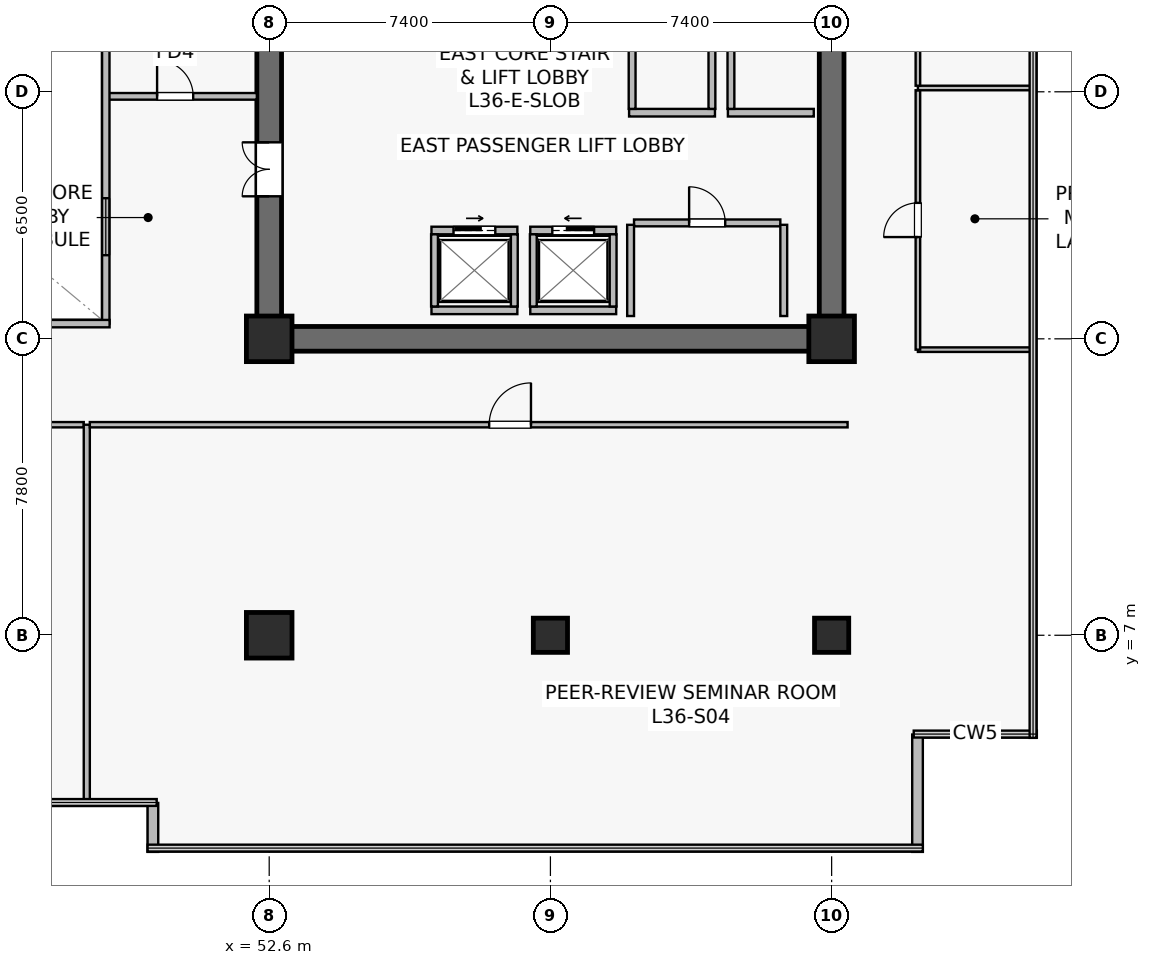
"""IFC4 building model, lengths in metres.
Left out: names, types, materials, properties, quantities, classifications, styles, units other than length and angle.
Written with IfcOpenShell. Run it as: python <this file> out.ifc"""

import sys

from ifc_helpers import new_model, si_unit, direction, frame, frame_2d, origin, origin_2d, place, context, subcontext, project, spatial, rectangle, extrude, source, transform, mapped, element, fill, save


model = new_model("IFC4")
c1 = context("Model", 3, precision=1e-05, world=origin(), true_north=direction((0.0, 1.0)))
c2 = subcontext(c1, "Body", "Model", "MODEL_VIEW")
j1 = project(units=[si_unit("LENGTHUNIT", "METRE"), si_unit("PLANEANGLEUNIT", "RADIAN")], contexts=[c1])
p1 = place(None, origin())
s1 = spatial("IfcSite", under=j1, at=p1, CompositionType="ELEMENT")
p2 = place(p1, origin())
s2 = spatial("IfcBuilding", under=s1, at=p2, CompositionType="ELEMENT")
p3 = place(p2, frame((0.0, 0.0, 150.2)))
s3 = spatial("IfcBuildingStorey", under=s2, at=p3, CompositionType="ELEMENT", Elevation=150.2)
p4 = place(p3, frame((52.275, 14.8, 0.0), z_axis=(0.0, 0.0, 1.0), x_axis=(1.0, 0.0, 0.0)))
e1 = element("IfcWall", 1, at=p4, inside=s3, PredefinedType="SHEAR", context=c2, shape_type="SweptSolid", body=[
    extrude(rectangle(XDim=15.45, YDim=0.65, at=frame_2d((7.725, 0.0))), origin(), (0.0, 0.0, 1.0), 3.79),
])
p5 = place(p3, frame((52.6, 15.125, 0.0), z_axis=(0.0, 0.0, 1.0), x_axis=(0.0, 1.0, 0.0)))
e2 = element("IfcWall", 2, at=p5, inside=s3, PredefinedType="SHEAR", context=c2, shape_type="SweptSolid", body=[
    extrude(rectangle(XDim=18.35, YDim=0.65, at=frame_2d((9.175, 0.0))), origin(), (0.0, 0.0, 1.0), 3.79),
])
p6 = place(p5, frame((3.425, 0.0, 0.0)))
e3 = element("IfcOpeningElement", 3, at=p6, cuts=e2, PredefinedType="OPENING", context=c2, shape_type="SweptSolid", body=[
    extrude(rectangle(XDim=1.42, YDim=2.2, at=frame_2d((0.71, 1.1))), frame((0.0, 0.335, 0.0), z_axis=(0.0, -1.0, 0.0), x_axis=(1.0, 0.0, 0.0)), (0.0, 0.0, 1.0), 0.67),
])
p7 = place(p3, frame((67.4, 15.125, 0.0), z_axis=(0.0, 0.0, 1.0), x_axis=(0.0, 1.0, 0.0)))
e4 = element("IfcWall", 4, at=p7, inside=s3, PredefinedType="SHEAR", context=c2, shape_type="SweptSolid", body=[
    extrude(rectangle(XDim=18.35, YDim=0.65, at=frame_2d((9.175, 0.0))), origin(), (0.0, 0.0, 1.0), 3.79),
])
m1 = source(origin(), c2, "Body", "SweptSolid", [
    extrude(rectangle(XDim=1.2, YDim=1.2, at=origin_2d()), origin(), (0.0, 0.0, 1.0), 4.1),
])
p8 = place(p3, frame((52.6, 7.0, 0.0), z_axis=(0.0, 0.0, 1.0), x_axis=(1.0, 0.0, 0.0)))
e5 = element("IfcColumn", 5, at=p8, inside=s3, PredefinedType="COLUMN", context=c2, shape_type="MappedRepresentation", body=[
    mapped(m1, transform((0.0, 0.0, 0.0), scale=1.0)),
])
m2 = source(origin(), c2, "Body", "SweptSolid", [
    extrude(rectangle(XDim=0.9, YDim=0.9, at=origin_2d()), origin(), (0.0, 0.0, 1.0), 4.1),
])
p9 = place(p3, frame((60.0, 7.0, 0.0), z_axis=(0.0, 0.0, 1.0), x_axis=(1.0, 0.0, 0.0)))
e6 = element("IfcColumn", 6, at=p9, inside=s3, PredefinedType="COLUMN", context=c2, shape_type="MappedRepresentation", body=[
    mapped(m2, transform((0.0, 0.0, 0.0), scale=1.0)),
])
for number, where, z_axis, x_axis in (
    (7, (52.6, 14.8, 0.0), (0.0, 0.0, 1.0), (1.0, 0.0, 0.0)),
    (8, (67.4, 14.8, 0.0), (0.0, 0.0, 1.0), (1.0, 0.0, 0.0)),
):
    element("IfcColumn", number, at=place(p3, frame(where, z_axis=z_axis, x_axis=x_axis)), inside=s3, PredefinedType="COLUMN", context=c2, shape_type="MappedRepresentation", body=[
        mapped(m1, transform((0.0, 0.0, 0.0), scale=1.0)),
    ])
p10 = place(p3, frame((67.4, 7.0, 0.0), z_axis=(0.0, 0.0, 1.0), x_axis=(1.0, 0.0, 0.0)))
e9 = element("IfcColumn", 9, at=p10, inside=s3, PredefinedType="COLUMN", context=c2, shape_type="MappedRepresentation", body=[
    mapped(m2, transform((0.0, 0.0, 0.0), scale=1.0)),
])
p11 = place(p3, frame((49.54, 2.588, 0.0), z_axis=(0.0, 0.0, 1.0), x_axis=(0.0, -1.0, 0.0)))
e10 = element("IfcWall", 10, at=p11, inside=s3, PredefinedType="STANDARD", context=c2, shape_type="SweptSolid", body=[
    extrude(rectangle(XDim=1.288, YDim=0.28, at=frame_2d((0.644, 0.0))), origin(), (0.0, 0.0, 1.0), 3.79),
])
p12 = place(p3, frame((69.66, 1.3, 0.0), z_axis=(0.0, 0.0, 1.0), x_axis=(0.0, 1.0, 0.0)))
e11 = element("IfcWall", 11, at=p12, inside=s3, PredefinedType="STANDARD", context=c2, shape_type="SweptSolid", body=[
    extrude(rectangle(XDim=3.088, YDim=0.28, at=frame_2d((1.544, 0.0))), origin(), (0.0, 0.0, 1.0), 3.79),
])
p13 = place(p3, frame((59.47, 17.65, 0.0), z_axis=(0.0, 0.0, 1.0), x_axis=(1.0, 0.0, 0.0)))
e12 = element("IfcWall", 12, at=p13, inside=s3, PredefinedType="SOLIDWALL", context=c2, shape_type="SweptSolid", body=[
    extrude(rectangle(XDim=2.26, YDim=0.2, at=frame_2d((1.13, 0.0))), origin(), (0.0, 0.0, 1.0), 3.187),
])
p14 = place(p13, frame((0.58, 0.0, 0.0)))
e13 = element("IfcOpeningElement", 13, at=p14, cuts=e12, PredefinedType="OPENING", context=c2, shape_type="SweptSolid", body=[
    extrude(rectangle(XDim=1.1, YDim=2.22, at=frame_2d((0.55, 1.11))), frame((0.0, 0.11, 0.0), z_axis=(0.0, -1.0, 0.0), x_axis=(1.0, 0.0, 0.0)), (0.0, 0.0, 1.0), 0.22),
])
p15 = place(p3, frame((59.47, 15.55, 0.0), z_axis=(0.0, 0.0, 1.0), x_axis=(1.0, 0.0, 0.0)))
e14 = element("IfcWall", 14, at=p15, inside=s3, PredefinedType="SOLIDWALL", context=c2, shape_type="SweptSolid", body=[
    extrude(rectangle(XDim=2.26, YDim=0.2, at=frame_2d((1.13, 0.0))), origin(), (0.0, 0.0, 1.0), 3.187),
])
for number, where, z_axis, x_axis in (
    (15, (59.55, 15.65, 0.0), (0.0, 0.0, 1.0), (0.0, 1.0, 0.0)),
    (16, (61.65, 15.65, 0.0), (0.0, 0.0, 1.0), (0.0, 1.0, 0.0)),
):
    element("IfcWall", number, at=place(p3, frame(where, z_axis=z_axis, x_axis=x_axis)), inside=s3, PredefinedType="SOLIDWALL", context=c2, shape_type="SweptSolid", body=[
        extrude(rectangle(XDim=1.9, YDim=0.18, at=frame_2d((0.95, 0.0))), origin(), (0.0, 0.0, 1.0), 3.79),
    ])
p16 = place(p3, frame((56.87, 17.65, 0.0), z_axis=(0.0, 0.0, 1.0), x_axis=(1.0, 0.0, 0.0)))
e17 = element("IfcWall", 17, at=p16, inside=s3, PredefinedType="SOLIDWALL", context=c2, shape_type="SweptSolid", body=[
    extrude(rectangle(XDim=2.26, YDim=0.2, at=frame_2d((1.13, 0.0))), origin(), (0.0, 0.0, 1.0), 3.79),
])
p17 = place(p16, frame((0.58, 0.0, 0.0)))
e18 = element("IfcOpeningElement", 18, at=p17, cuts=e17, PredefinedType="OPENING", context=c2, shape_type="SweptSolid", body=[
    extrude(rectangle(XDim=1.1, YDim=2.22, at=frame_2d((0.55, 1.11))), frame((0.0, 0.11, 0.0), z_axis=(0.0, -1.0, 0.0), x_axis=(1.0, 0.0, 0.0)), (0.0, 0.0, 1.0), 0.22),
])
p18 = place(p3, frame((56.87, 15.55, 0.0), z_axis=(0.0, 0.0, 1.0), x_axis=(1.0, 0.0, 0.0)))
e19 = element("IfcWall", 19, at=p18, inside=s3, PredefinedType="SOLIDWALL", context=c2, shape_type="SweptSolid", body=[
    extrude(rectangle(XDim=2.26, YDim=0.2, at=frame_2d((1.13, 0.0))), origin(), (0.0, 0.0, 1.0), 3.79),
])
for number, where, z_axis, x_axis in (
    (20, (56.95, 15.65, 0.0), (0.0, 0.0, 1.0), (0.0, 1.0, 0.0)),
    (21, (59.05, 15.65, 0.0), (0.0, 0.0, 1.0), (0.0, 1.0, 0.0)),
):
    element("IfcWall", number, at=place(p3, frame(where, z_axis=z_axis, x_axis=x_axis)), inside=s3, PredefinedType="SOLIDWALL", context=c2, shape_type="SweptSolid", body=[
        extrude(rectangle(XDim=1.9, YDim=0.18, at=frame_2d((0.95, 0.0))), origin(), (0.0, 0.0, 1.0), 3.79),
    ])
p19 = place(p3, frame((64.67, 20.75, 0.0), z_axis=(0.0, 0.0, 1.0), x_axis=(1.0, 0.0, 0.0)))
e22 = element("IfcWall", 22, at=p19, inside=s3, PredefinedType="SOLIDWALL", context=c2, shape_type="SweptSolid", body=[
    extrude(rectangle(XDim=2.26, YDim=0.2, at=frame_2d((1.13, 0.0))), origin(), (0.0, 0.0, 1.0), 3.79),
])
p20 = place(p3, frame((64.75, 20.85, 0.0), z_axis=(0.0, 0.0, 1.0), x_axis=(0.0, 1.0, 0.0)))
e23 = element("IfcWall", 23, at=p20, inside=s3, PredefinedType="SOLIDWALL", context=c2, shape_type="SweptSolid", body=[
    extrude(rectangle(XDim=1.9, YDim=0.18, at=frame_2d((0.95, 0.0))), origin(), (0.0, 0.0, 1.0), 3.79),
])
p21 = place(p3, frame((62.07, 20.75, 0.0), z_axis=(0.0, 0.0, 1.0), x_axis=(1.0, 0.0, 0.0)))
e24 = element("IfcWall", 24, at=p21, inside=s3, PredefinedType="SOLIDWALL", context=c2, shape_type="SweptSolid", body=[
    extrude(rectangle(XDim=2.26, YDim=0.2, at=frame_2d((1.13, 0.0))), origin(), (0.0, 0.0, 1.0), 3.79),
])
for number, where, z_axis, x_axis in (
    (25, (62.15, 20.85, 0.0), (0.0, 0.0, 1.0), (0.0, 1.0, 0.0)),
    (26, (64.25, 20.85, 0.0), (0.0, 0.0, 1.0), (0.0, 1.0, 0.0)),
):
    element("IfcWall", number, at=place(p3, frame(where, z_axis=z_axis, x_axis=x_axis)), inside=s3, PredefinedType="SOLIDWALL", context=c2, shape_type="SweptSolid", body=[
        extrude(rectangle(XDim=1.9, YDim=0.18, at=frame_2d((0.95, 0.0))), origin(), (0.0, 0.0, 1.0), 3.79),
    ])
p22 = place(p3, frame((62.2, 17.85, 0.0), z_axis=(0.0, 0.0, 1.0), x_axis=(1.0, 0.0, 0.0)))
e27 = element("IfcWall", 27, at=p22, inside=s3, PredefinedType="SOLIDWALL", context=c2, shape_type="SweptSolid", body=[
    extrude(rectangle(XDim=3.85, YDim=0.18, at=frame_2d((1.925, 0.0))), origin(), (0.0, 0.0, 1.0), 3.79),
])
p23 = place(p22, frame((1.45, 0.0, 0.0)))
e28 = element("IfcOpeningElement", 28, at=p23, cuts=e27, PredefinedType="OPENING", context=c2, shape_type="SweptSolid", body=[
    extrude(rectangle(XDim=0.95, YDim=2.15, at=frame_2d((0.475, 1.075))), frame((0.0, 0.1, 0.0), z_axis=(0.0, -1.0, 0.0), x_axis=(1.0, 0.0, 0.0)), (0.0, 0.0, 1.0), 0.2),
])
for number, where, z_axis, x_axis in (
    (29, (62.11, 15.4, 0.0), (0.0, 0.0, 1.0), (0.0, 1.0, 0.0)),
    (30, (66.14, 15.4, 0.0), (0.0, 0.0, 1.0), (0.0, 1.0, 0.0)),
):
    element("IfcWall", number, at=place(p3, frame(where, z_axis=z_axis, x_axis=x_axis)), inside=s3, PredefinedType="SOLIDWALL", context=c2, shape_type="SweptSolid", body=[
        extrude(rectangle(XDim=2.4, YDim=0.18, at=frame_2d((1.2, 0.0))), origin(), (0.0, 0.0, 1.0), 3.79),
    ])
p24 = place(p3, frame((48.3, 21.18, 0.0), z_axis=(0.0, 0.0, 1.0), x_axis=(1.0, 0.0, 0.0)))
e31 = element("IfcWall", 31, at=p24, inside=s3, PredefinedType="PARTITIONING", context=c2, shape_type="SweptSolid", body=[
    extrude(rectangle(XDim=3.975, YDim=0.175, at=frame_2d((1.987, 0.0))), origin(), (0.0, 0.0, 1.0), 3.79),
])
p25 = place(p24, frame((1.35, 0.0, 0.0)))
e32 = element("IfcOpeningElement", 32, at=p25, cuts=e31, PredefinedType="OPENING", context=c2, shape_type="SweptSolid", body=[
    extrude(rectangle(XDim=0.95, YDim=2.15, at=frame_2d((0.475, 1.075))), frame((0.0, 0.098, 0.0), z_axis=(0.0, -1.0, 0.0), x_axis=(1.0, 0.0, 0.0)), (0.0, 0.0, 1.0), 0.195),
])
p26 = place(p3, frame((48.3, 15.2, 0.0), z_axis=(0.0, 0.0, 1.0), x_axis=(0.0, 1.0, 0.0)))
e33 = element("IfcWall", 33, at=p26, inside=s3, PredefinedType="SOLIDWALL", context=c2, shape_type="SweptSolid", body=[
    extrude(rectangle(XDim=18.2, YDim=0.195, at=frame_2d((9.1, 0.0))), origin(), (0.0, 0.0, 1.0), 3.79),
])
p27 = place(p26, frame((1.8, 0.0, 0.9)))
e34 = element("IfcOpeningElement", 34, at=p27, cuts=e33, PredefinedType="OPENING", context=c2, shape_type="SweptSolid", body=[
    extrude(rectangle(XDim=1.5, YDim=1.4, at=frame_2d((0.75, 0.7))), frame((0.0, 0.107, 0.0), z_axis=(0.0, -1.0, 0.0), x_axis=(1.0, 0.0, 0.0)), (0.0, 0.0, 1.0), 0.215),
])
p28 = place(p26, frame((13.2, 0.0, 0.9)))
e35 = element("IfcOpeningElement", 35, at=p28, cuts=e33, PredefinedType="OPENING", context=c2, shape_type="SweptSolid", body=[
    extrude(rectangle(XDim=1.5, YDim=1.4, at=frame_2d((0.75, 0.7))), frame((0.0, 0.107, 0.0), z_axis=(0.0, -1.0, 0.0), x_axis=(1.0, 0.0, 0.0)), (0.0, 0.0, 1.0), 0.215),
])
p29 = place(p3, frame((26.4, 15.2, 0.0), z_axis=(0.0, 0.0, 1.0), x_axis=(1.0, 0.0, 0.0)))
e36 = element("IfcWall", 36, at=p29, inside=s3, PredefinedType="SOLIDWALL", context=c2, shape_type="SweptSolid", body=[
    extrude(rectangle(XDim=22.0, YDim=0.195, at=frame_2d((11.0, 0.0))), origin(), (0.0, 0.0, 1.0), 3.79),
])
p30 = place(p3, frame((29.68, 12.54, 0.0), z_axis=(0.0, 0.0, 1.0), x_axis=(1.0, 0.0, 0.0)))
e37 = element("IfcWall", 37, at=p30, inside=s3, PredefinedType="PARTITIONING", context=c2, shape_type="SweptSolid", body=[
    extrude(rectangle(XDim=18.04, YDim=0.14, at=frame_2d((9.02, 0.0))), origin(), (0.0, 0.0, 1.0), 3.187),
])
p31 = place(p30, frame((7.496, 0.0, 0.0)))
e38 = element("IfcOpeningElement", 38, at=p31, cuts=e37, PredefinedType="OPENING", context=c2, shape_type="SweptSolid", body=[
    extrude(rectangle(XDim=1.1, YDim=2.18, at=frame_2d((0.55, 1.09))), frame((0.0, 0.08, 0.0), z_axis=(0.0, -1.0, 0.0), x_axis=(1.0, 0.0, 0.0)), (0.0, 0.0, 1.0), 0.16),
])
p32 = place(p3, frame((47.8, 2.61, 0.0), z_axis=(0.0, 0.0, 1.0), x_axis=(0.0, 1.0, 0.0)))
e39 = element("IfcWall", 39, at=p32, inside=s3, PredefinedType="PARTITIONING", context=c2, shape_type="SweptSolid", body=[
    extrude(rectangle(XDim=9.93, YDim=0.16, at=frame_2d((4.965, 0.0))), origin(), (0.0, 0.0, 1.0), 3.075),
])
p33 = place(p3, frame((47.88, 12.54, 0.0), z_axis=(0.0, 0.0, 1.0), x_axis=(1.0, 0.0, 0.0)))
e40 = element("IfcWall", 40, at=p33, inside=s3, PredefinedType="PARTITIONING", context=c2, shape_type="SweptSolid", body=[
    extrude(rectangle(XDim=19.94, YDim=0.14, at=frame_2d((9.97, 0.0))), origin(), (0.0, 0.0, 1.0), 3.187),
])
p34 = place(p33, frame((10.508, 0.0, 0.0)))
e41 = element("IfcOpeningElement", 41, at=p34, cuts=e40, PredefinedType="OPENING", context=c2, shape_type="SweptSolid", body=[
    extrude(rectangle(XDim=1.1, YDim=2.18, at=frame_2d((0.55, 1.09))), frame((0.0, 0.08, 0.0), z_axis=(0.0, -1.0, 0.0), x_axis=(1.0, 0.0, 0.0)), (0.0, 0.0, 1.0), 0.16),
])
p35 = place(p3, frame((69.67, 14.515, 0.0), z_axis=(0.0, 0.0, 1.0), x_axis=(1.0, 0.0, 0.0)))
e42 = element("IfcWall", 42, at=p35, inside=s3, PredefinedType="PARTITIONING", context=c2, shape_type="SweptSolid", body=[
    extrude(rectangle(XDim=3.02, YDim=0.12, at=frame_2d((1.51, 0.0))), origin(), (0.0, 0.0, 1.0), 3.79),
])
p36 = place(p3, frame((69.67, 14.515, 0.0), z_axis=(0.0, 0.0, 1.0), x_axis=(0.0, 1.0, 0.0)))
e43 = element("IfcWall", 43, at=p36, inside=s3, PredefinedType="PARTITIONING", context=c2, shape_type="SweptSolid", body=[
    extrude(rectangle(XDim=6.825, YDim=0.12, at=frame_2d((3.413, 0.0))), origin(), (0.0, 0.0, 1.0), 3.79),
])
p37 = place(p36, frame((2.962, 0.0, 0.0)))
e44 = element("IfcOpeningElement", 44, at=p37, cuts=e43, PredefinedType="OPENING", context=c2, shape_type="SweptSolid", body=[
    extrude(rectangle(XDim=0.9, YDim=2.1, at=frame_2d((0.45, 1.05))), frame((0.0, 0.07, 0.0), z_axis=(0.0, -1.0, 0.0), x_axis=(1.0, 0.0, 0.0)), (0.0, 0.0, 1.0), 0.14),
])
p38 = place(p3, frame((69.67, 21.4, 0.0), z_axis=(0.0, 0.0, 1.0), x_axis=(1.0, 0.0, 0.0)))
e45 = element("IfcWall", 45, at=p38, inside=s3, PredefinedType="PARTITIONING", context=c2, shape_type="SweptSolid", body=[
    extrude(rectangle(XDim=3.02, YDim=0.12, at=frame_2d((1.51, 0.0))), origin(), (0.0, 0.0, 1.0), 3.79),
])
p39 = place(p3, frame((69.67, 21.46, 0.0), z_axis=(0.0, 0.0, 1.0), x_axis=(0.0, 1.0, 0.0)))
e46 = element("IfcWall", 46, at=p39, inside=s3, PredefinedType="PARTITIONING", context=c2, shape_type="SweptSolid", body=[
    extrude(rectangle(XDim=6.68, YDim=0.12, at=frame_2d((3.34, 0.0))), origin(), (0.0, 0.0, 1.0), 3.79),
])
p40 = place(p39, frame((2.89, 0.0, 0.0)))
e47 = element("IfcOpeningElement", 47, at=p40, cuts=e46, PredefinedType="OPENING", context=c2, shape_type="SweptSolid", body=[
    extrude(rectangle(XDim=0.9, YDim=2.1, at=frame_2d((0.45, 1.05))), frame((0.0, 0.07, 0.0), z_axis=(0.0, -1.0, 0.0), x_axis=(1.0, 0.0, 0.0)), (0.0, 0.0, 1.0), 0.14),
])
m3 = source(origin(), c2, "Body", "SweptSolid", [
    extrude(rectangle(XDim=1.5, YDim=1.4, at=frame_2d((0.75, 0.7))), frame((0.0, 0.03, 0.0), z_axis=(0.0, -1.0, 0.0), x_axis=(1.0, 0.0, 0.0)), (0.0, 0.0, 1.0), 0.06),
])
p41 = place(p27, origin())
e48 = element("IfcWindow", 48, at=p41, inside=s3, PartitioningType="SINGLE_PANEL", PredefinedType="WINDOW", context=c2, shape_type="MappedRepresentation", body=[
    mapped(m3, transform((0.0, 0.0, 0.0), scale=1.0)),
])
fill(e34, e48)
m4 = source(origin(), c2, "Body", "SweptSolid", [
    extrude(rectangle(XDim=1.1, YDim=2.22, at=frame_2d((0.55, 1.11))), frame((0.0, 0.025, 0.0), z_axis=(0.0, -1.0, 0.0), x_axis=(1.0, 0.0, 0.0)), (0.0, 0.0, 1.0), 0.05),
])
p42 = place(p14, origin())
e49 = element("IfcDoor", 49, at=p42, inside=s3, OperationType="SLIDING_TO_LEFT", PredefinedType="USERDEFINED", context=c2, shape_type="MappedRepresentation", body=[
    mapped(m4, transform((0.0, 0.0, 0.0), scale=1.0)),
])
fill(e13, e49)
p43 = place(p17, origin())
e50 = element("IfcDoor", 50, at=p43, inside=s3, OperationType="SLIDING_TO_RIGHT", PredefinedType="USERDEFINED", context=c2, shape_type="MappedRepresentation", body=[
    mapped(m4, transform((0.0, 0.0, 0.0), scale=1.0)),
])
fill(e18, e50)
m5 = source(origin(), c2, "Body", "SweptSolid", [
    extrude(rectangle(XDim=0.95, YDim=2.15, at=frame_2d((0.475, 1.075))), frame((0.0, 0.025, 0.0), z_axis=(0.0, -1.0, 0.0), x_axis=(1.0, 0.0, 0.0)), (0.0, 0.0, 1.0), 0.05),
])
p44 = place(p23, origin())
e51 = element("IfcDoor", 51, at=p44, inside=s3, OperationType="SINGLE_SWING_LEFT", PredefinedType="DOOR", context=c2, shape_type="MappedRepresentation", body=[
    mapped(m5, transform((0.0, 0.0, 0.0), scale=1.0)),
])
fill(e28, e51)
m6 = source(origin(), c2, "Body", "SweptSolid", [
    extrude(rectangle(XDim=1.42, YDim=2.2, at=frame_2d((0.71, 1.1))), frame((0.0, 0.025, 0.0), z_axis=(0.0, -1.0, 0.0), x_axis=(1.0, 0.0, 0.0)), (0.0, 0.0, 1.0), 0.05),
])
p45 = place(p6, origin())
e52 = element("IfcDoor", 52, at=p45, inside=s3, OperationType="DOUBLE_DOOR_SINGLE_SWING", PredefinedType="DOOR", context=c2, shape_type="MappedRepresentation", body=[
    mapped(m6, transform((0.0, 0.0, 0.0), scale=1.0)),
])
fill(e3, e52)
p46 = place(p25, origin())
e53 = element("IfcDoor", 53, at=p46, inside=s3, OperationType="SINGLE_SWING_LEFT", PredefinedType="DOOR", context=c2, shape_type="MappedRepresentation", body=[
    mapped(m5, transform((0.0, 0.0, 0.0), scale=1.0)),
])
fill(e32, e53)
m7 = source(origin(), c2, "Body", "SweptSolid", [
    extrude(rectangle(XDim=1.1, YDim=2.18, at=frame_2d((0.55, 1.09))), frame((0.0, 0.025, 0.0), z_axis=(0.0, -1.0, 0.0), x_axis=(1.0, 0.0, 0.0)), (0.0, 0.0, 1.0), 0.05),
])
p47 = place(p34, origin())
e54 = element("IfcDoor", 54, at=p47, inside=s3, OperationType="SINGLE_SWING_RIGHT", PredefinedType="DOOR", context=c2, shape_type="MappedRepresentation", body=[
    mapped(m7, transform((0.0, 0.0, 0.0), scale=1.0)),
])
fill(e41, e54)
m8 = source(origin(), c2, "Body", "SweptSolid", [
    extrude(rectangle(XDim=0.9, YDim=2.1, at=frame_2d((0.45, 1.05))), frame((0.0, 0.025, 0.0), z_axis=(0.0, -1.0, 0.0), x_axis=(1.0, 0.0, 0.0)), (0.0, 0.0, 1.0), 0.05),
])
p48 = place(p37, origin())
e55 = element("IfcDoor", 55, at=p48, inside=s3, OperationType="SINGLE_SWING_LEFT", PredefinedType="DOOR", context=c2, shape_type="MappedRepresentation", body=[
    mapped(m8, transform((0.0, 0.0, 0.0), scale=1.0)),
])
fill(e44, e55)
save(model, sys.argv[1])
